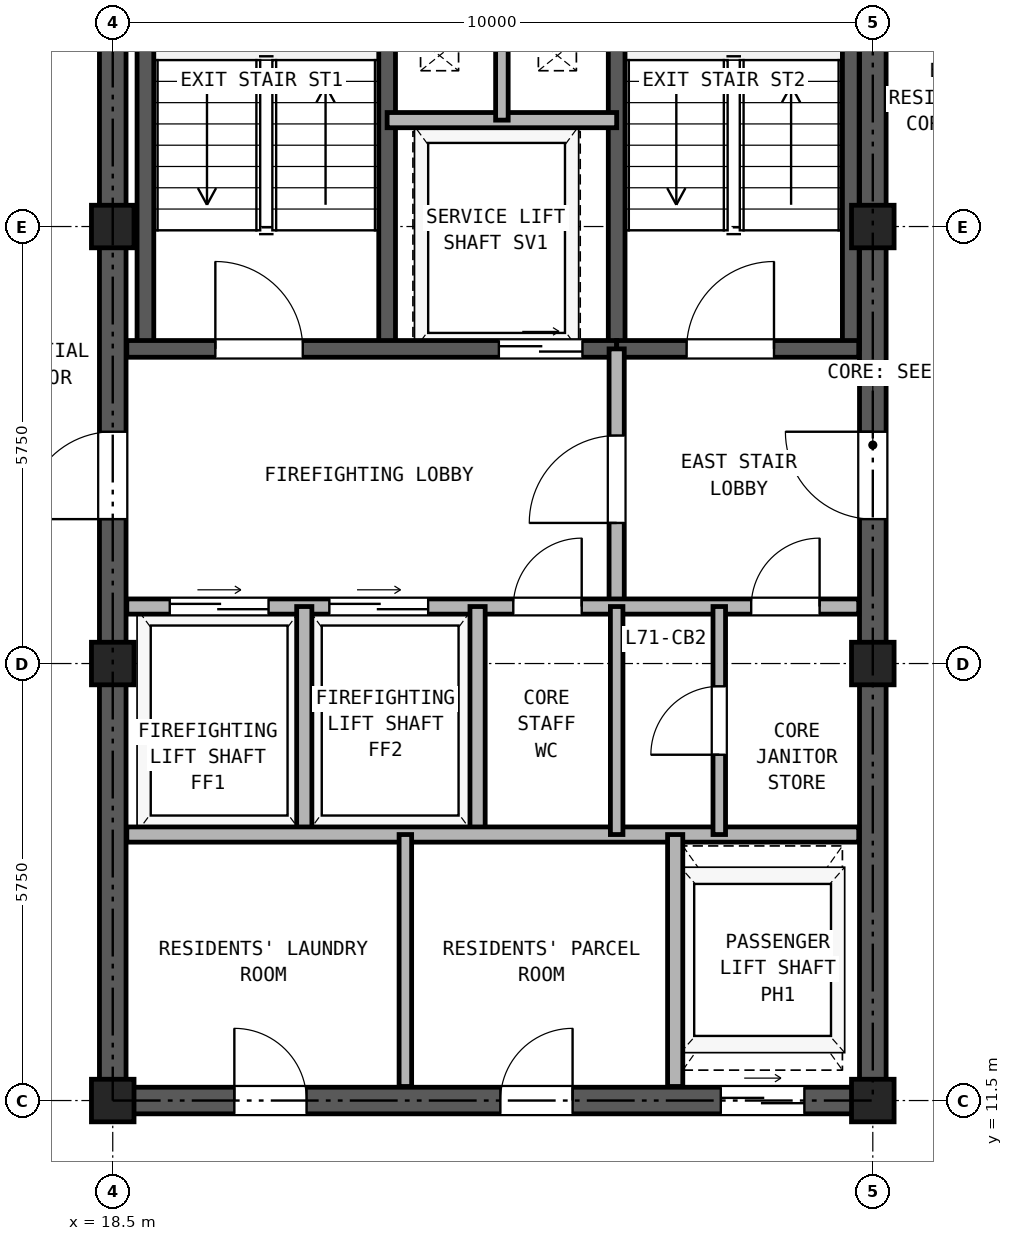
"""IFC4 building model, lengths in metres.
Left out: names, types, materials, properties, quantities, classifications, styles, units other than length and angle.
Written with IfcOpenShell. Run it as: python <this file> out.ifc"""

import sys

from ifc_helpers import new_model, si_unit, direction, frame, frame_2d, origin, origin_2d, place, context, subcontext, project, spatial, rectangle, hollow_rectangle, extrude, source, transform, mapped, element, fill, save


model = new_model("IFC4")
c1 = context("Model", 3, precision=1e-05, world=origin(), true_north=direction((0.0, 1.0)))
c2 = subcontext(c1, "Body", "Model", "MODEL_VIEW")
j1 = project(units=[si_unit("LENGTHUNIT", "METRE"), si_unit("PLANEANGLEUNIT", "RADIAN")], contexts=[c1])
p1 = place(None, origin())
s1 = spatial("IfcSite", under=j1, at=p1, CompositionType="ELEMENT")
p2 = place(p1, origin())
s2 = spatial("IfcBuilding", under=s1, at=p2, CompositionType="ELEMENT")
p3 = place(p2, frame((0.0, 0.0, 248.9)))
s3 = spatial("IfcBuildingStorey", under=s2, at=p3, CompositionType="ELEMENT", Elevation=248.9)
m1 = source(origin(), c2, "Body", "SweptSolid", [
    extrude(hollow_rectangle(XDim=0.56, YDim=0.56, WallThickness=0.03, at=origin_2d()), origin(), (0.0, 0.0, 1.0), 2.98),
])
for number, where, z_axis, x_axis in (
    (1, (18.5, 11.5, 0.0), (0.0, 0.0, 1.0), (1.0, 0.0, 0.0)),
    (2, (18.5, 17.25, 0.0), (0.0, 0.0, 1.0), (1.0, 0.0, 0.0)),
    (3, (18.5, 23.0, 0.0), (0.0, 0.0, 1.0), (1.0, 0.0, 0.0)),
    (4, (28.5, 11.5, 0.0), (0.0, 0.0, 1.0), (1.0, 0.0, 0.0)),
    (5, (28.5, 17.25, 0.0), (0.0, 0.0, 1.0), (1.0, 0.0, 0.0)),
    (6, (28.5, 23.0, 0.0), (0.0, 0.0, 1.0), (1.0, 0.0, 0.0)),
):
    element("IfcColumn", number, at=place(p3, frame(where, z_axis=z_axis, x_axis=x_axis)), inside=s3, PredefinedType="COLUMN", context=c2, shape_type="MappedRepresentation", body=[
        mapped(m1, transform((0.0, 0.0, 0.0), x_axis=(1.0, 0.0, 0.0), y_axis=(0.0, 1.0, 0.0), z_axis=(0.0, 0.0, 1.0), scale=1.0)),
    ])
p4 = place(p3, frame((18.325, 11.5, 0.0), z_axis=(0.0, 0.0, 1.0), x_axis=(1.0, 0.0, 0.0)))
e7 = element("IfcWall", 7, at=p4, inside=s3, PredefinedType="SHEAR", context=c2, shape_type="SweptSolid", body=[
    extrude(rectangle(XDim=10.35, YDim=0.35, at=frame_2d((5.175, 0.0))), origin(), (0.0, 0.0, 1.0), 2.98),
])
p5 = place(p4, frame((1.775, 0.0, 0.0)))
e8 = element("IfcOpeningElement", 8, at=p5, cuts=e7, PredefinedType="OPENING", context=c2, shape_type="SweptSolid", body=[
    extrude(rectangle(XDim=0.95, YDim=2.15, at=frame_2d((0.475, 1.075))), frame((0.0, 0.185, 0.0), z_axis=(0.0, -1.0, 0.0), x_axis=(1.0, 0.0, 0.0)), (0.0, 0.0, 1.0), 0.37),
])
p6 = place(p4, frame((5.275, 0.0, 0.0)))
e9 = element("IfcOpeningElement", 9, at=p6, cuts=e7, PredefinedType="OPENING", context=c2, shape_type="SweptSolid", body=[
    extrude(rectangle(XDim=0.95, YDim=2.15, at=frame_2d((0.475, 1.075))), frame((0.0, 0.185, 0.0), z_axis=(0.0, -1.0, 0.0), x_axis=(1.0, 0.0, 0.0)), (0.0, 0.0, 1.0), 0.37),
])
p7 = place(p4, frame((8.175, 0.0, 0.0)))
e10 = element("IfcOpeningElement", 10, at=p7, cuts=e7, PredefinedType="OPENING", context=c2, shape_type="SweptSolid", body=[
    extrude(rectangle(XDim=1.1, YDim=2.25, at=frame_2d((0.55, 1.125))), frame((0.0, 0.185, 0.0), z_axis=(0.0, -1.0, 0.0), x_axis=(1.0, 0.0, 0.0)), (0.0, 0.0, 1.0), 0.37),
])
p8 = place(p3, frame((18.5, 11.675, 0.0), z_axis=(0.0, 0.0, 1.0), x_axis=(0.0, 1.0, 0.0)))
e11 = element("IfcWall", 11, at=p8, inside=s3, PredefinedType="SHEAR", context=c2, shape_type="SweptSolid", body=[
    extrude(rectangle(XDim=16.9, YDim=0.35, at=frame_2d((8.45, 0.0))), origin(), (0.0, 0.0, 1.0), 2.98),
])
p9 = place(p8, frame((7.475, 0.0, 0.0)))
e12 = element("IfcOpeningElement", 12, at=p9, cuts=e11, PredefinedType="OPENING", context=c2, shape_type="SweptSolid", body=[
    extrude(rectangle(XDim=1.15, YDim=2.2, at=frame_2d((0.575, 1.1))), frame((0.0, 0.185, 0.0), z_axis=(0.0, -1.0, 0.0), x_axis=(1.0, 0.0, 0.0)), (0.0, 0.0, 1.0), 0.37),
])
p10 = place(p3, frame((28.5, 11.675, 0.0), z_axis=(0.0, 0.0, 1.0), x_axis=(0.0, 1.0, 0.0)))
e13 = element("IfcWall", 13, at=p10, inside=s3, PredefinedType="SHEAR", context=c2, shape_type="SweptSolid", body=[
    extrude(rectangle(XDim=16.9, YDim=0.35, at=frame_2d((8.45, 0.0))), origin(), (0.0, 0.0, 1.0), 2.98),
])
p11 = place(p10, frame((7.475, 0.0, 0.0)))
e14 = element("IfcOpeningElement", 14, at=p11, cuts=e13, PredefinedType="OPENING", context=c2, shape_type="SweptSolid", body=[
    extrude(rectangle(XDim=1.15, YDim=2.2, at=frame_2d((0.575, 1.1))), frame((0.0, 0.185, 0.0), z_axis=(0.0, -1.0, 0.0), x_axis=(1.0, 0.0, 0.0)), (0.0, 0.0, 1.0), 0.37),
])
for number, where, z_axis, x_axis in (
    (15, (18.93, 21.39, 0.0), (0.0, 0.0, 1.0), (0.0, 1.0, 0.0)),
    (16, (22.11, 21.39, 0.0), (0.0, 0.0, 1.0), (0.0, 1.0, 0.0)),
    (17, (25.13, 21.39, 0.0), (0.0, 0.0, 1.0), (0.0, 1.0, 0.0)),
):
    element("IfcWall", number, at=place(p3, frame(where, z_axis=z_axis, x_axis=x_axis)), inside=s3, PredefinedType="SOLIDWALL", context=c2, shape_type="SweptSolid", body=[
        extrude(rectangle(XDim=7.11, YDim=0.22, at=frame_2d((3.555, 0.0))), origin(), (0.0, 0.0, 1.0), 2.98),
    ])
p12 = place(p3, frame((28.21, 21.39, 0.0), z_axis=(0.0, 0.0, 1.0), x_axis=(0.0, 1.0, 0.0)))
e18 = element("IfcWall", 18, at=p12, inside=s3, PredefinedType="SOLIDWALL", context=c2, shape_type="SweptSolid", body=[
    extrude(rectangle(XDim=6.945, YDim=0.22, at=frame_2d((3.473, 0.0))), origin(), (0.0, 0.0, 1.0), 2.98),
])
p13 = place(p3, frame((18.685, 21.39, 0.0), z_axis=(0.0, 0.0, 1.0), x_axis=(1.0, 0.0, 0.0)))
e19 = element("IfcWall", 19, at=p13, inside=s3, PredefinedType="SOLIDWALL", context=c2, shape_type="SweptSolid", body=[
    extrude(rectangle(XDim=6.445, YDim=0.22, at=frame_2d((3.222, 0.0))), origin(), (0.0, 0.0, 1.0), 2.98),
])
p14 = place(p13, frame((1.165, 0.0, 0.0)))
e20 = element("IfcOpeningElement", 20, at=p14, cuts=e19, PredefinedType="OPENING", context=c2, shape_type="SweptSolid", body=[
    extrude(rectangle(XDim=1.15, YDim=2.2, at=frame_2d((0.575, 1.1))), frame((0.0, 0.12, 0.0), z_axis=(0.0, -1.0, 0.0), x_axis=(1.0, 0.0, 0.0)), (0.0, 0.0, 1.0), 0.24),
])
p15 = place(p13, frame((4.895, 0.0, 0.0)))
e21 = element("IfcOpeningElement", 21, at=p15, cuts=e19, PredefinedType="OPENING", context=c2, shape_type="SweptSolid", body=[
    extrude(rectangle(XDim=1.1, YDim=2.25, at=frame_2d((0.55, 1.125))), frame((0.0, 0.12, 0.0), z_axis=(0.0, -1.0, 0.0), x_axis=(1.0, 0.0, 0.0)), (0.0, 0.0, 1.0), 0.24),
])
p16 = place(p3, frame((25.13, 21.39, 0.0), z_axis=(0.0, 0.0, 1.0), x_axis=(1.0, 0.0, 0.0)))
e22 = element("IfcWall", 22, at=p16, inside=s3, PredefinedType="SOLIDWALL", context=c2, shape_type="SweptSolid", body=[
    extrude(rectangle(XDim=3.185, YDim=0.22, at=frame_2d((1.593, 0.0))), origin(), (0.0, 0.0, 1.0), 2.98),
])
p17 = place(p16, frame((0.92, 0.0, 0.0)))
e23 = element("IfcOpeningElement", 23, at=p17, cuts=e22, PredefinedType="OPENING", context=c2, shape_type="SweptSolid", body=[
    extrude(rectangle(XDim=1.15, YDim=2.2, at=frame_2d((0.575, 1.1))), frame((0.0, 0.12, 0.0), z_axis=(0.0, -1.0, 0.0), x_axis=(1.0, 0.0, 0.0)), (0.0, 0.0, 1.0), 0.24),
])
p18 = place(p3, frame((22.11, 24.4, 0.0), z_axis=(0.0, 0.0, 1.0), x_axis=(1.0, 0.0, 0.0)))
e24 = element("IfcWall", 24, at=p18, inside=s3, PredefinedType="PARTITIONING", context=c2, shape_type="SweptSolid", body=[
    extrude(rectangle(XDim=3.02, YDim=0.2, at=frame_2d((1.51, 0.0))), origin(), (0.0, 0.0, 1.0), 2.98),
])
p19 = place(p3, frame((23.62, 24.4, 0.0), z_axis=(0.0, 0.0, 1.0), x_axis=(0.0, 1.0, 0.0)))
e25 = element("IfcWall", 25, at=p19, inside=s3, PredefinedType="PARTITIONING", context=c2, shape_type="SweptSolid", body=[
    extrude(rectangle(XDim=4.165, YDim=0.165, at=frame_2d((2.083, 0.0))), origin(), (0.0, 0.0, 1.0), 2.98),
])
p20 = place(p3, frame((25.13, 18.0, 0.0), z_axis=(0.0, 0.0, 1.0), x_axis=(0.0, 1.0, 0.0)))
e26 = element("IfcWall", 26, at=p20, inside=s3, PredefinedType="PARTITIONING", context=c2, shape_type="SweptSolid", body=[
    extrude(rectangle(XDim=3.39, YDim=0.2, at=frame_2d((1.695, 0.0))), origin(), (0.0, 0.0, 1.0), 2.98),
])
p21 = place(p20, frame((1.1, 0.0, 0.0)))
e27 = element("IfcOpeningElement", 27, at=p21, cuts=e26, PredefinedType="OPENING", context=c2, shape_type="SweptSolid", body=[
    extrude(rectangle(XDim=1.15, YDim=2.2, at=frame_2d((0.575, 1.1))), frame((0.0, 0.11, 0.0), z_axis=(0.0, -1.0, 0.0), x_axis=(1.0, 0.0, 0.0)), (0.0, 0.0, 1.0), 0.22),
])
p22 = place(p3, frame((18.685, 18.0, 0.0), z_axis=(0.0, 0.0, 1.0), x_axis=(1.0, 0.0, 0.0)))
e28 = element("IfcWall", 28, at=p22, inside=s3, PredefinedType="PARTITIONING", context=c2, shape_type="SweptSolid", body=[
    extrude(rectangle(XDim=9.63, YDim=0.2, at=frame_2d((4.815, 0.0))), origin(), (0.0, 0.0, 1.0), 2.98),
])
p23 = place(p22, frame((0.565, 0.0, 0.0)))
e29 = element("IfcOpeningElement", 29, at=p23, cuts=e28, PredefinedType="OPENING", context=c2, shape_type="SweptSolid", body=[
    extrude(rectangle(XDim=1.3, YDim=2.3, at=frame_2d((0.65, 1.15))), frame((0.0, 0.11, 0.0), z_axis=(0.0, -1.0, 0.0), x_axis=(1.0, 0.0, 0.0)), (0.0, 0.0, 1.0), 0.22),
])
p24 = place(p22, frame((2.665, 0.0, 0.0)))
e30 = element("IfcOpeningElement", 30, at=p24, cuts=e28, PredefinedType="OPENING", context=c2, shape_type="SweptSolid", body=[
    extrude(rectangle(XDim=1.3, YDim=2.3, at=frame_2d((0.65, 1.15))), frame((0.0, 0.11, 0.0), z_axis=(0.0, -1.0, 0.0), x_axis=(1.0, 0.0, 0.0)), (0.0, 0.0, 1.0), 0.22),
])
p25 = place(p22, frame((5.085, 0.0, 0.0)))
e31 = element("IfcOpeningElement", 31, at=p25, cuts=e28, PredefinedType="OPENING", context=c2, shape_type="SweptSolid", body=[
    extrude(rectangle(XDim=0.9, YDim=2.05, at=frame_2d((0.45, 1.025))), frame((0.0, 0.11, 0.0), z_axis=(0.0, -1.0, 0.0), x_axis=(1.0, 0.0, 0.0)), (0.0, 0.0, 1.0), 0.22),
])
p26 = place(p22, frame((8.215, 0.0, 0.0)))
e32 = element("IfcOpeningElement", 32, at=p26, cuts=e28, PredefinedType="OPENING", context=c2, shape_type="SweptSolid", body=[
    extrude(rectangle(XDim=0.9, YDim=2.05, at=frame_2d((0.45, 1.025))), frame((0.0, 0.11, 0.0), z_axis=(0.0, -1.0, 0.0), x_axis=(1.0, 0.0, 0.0)), (0.0, 0.0, 1.0), 0.22),
])
for number, where, z_axis, x_axis in (
    (33, (21.02, 15.0, 0.0), (0.0, 0.0, 1.0), (0.0, 1.0, 0.0)),
    (34, (23.3, 15.0, 0.0), (0.0, 0.0, 1.0), (0.0, 1.0, 0.0)),
):
    element("IfcWall", number, at=place(p3, frame(where, z_axis=z_axis, x_axis=x_axis)), inside=s3, PredefinedType="PARTITIONING", context=c2, shape_type="SweptSolid", body=[
        extrude(rectangle(XDim=3.0, YDim=0.2, at=frame_2d((1.5, 0.0))), origin(), (0.0, 0.0, 1.0), 2.98),
    ])
p27 = place(p3, frame((18.685, 15.0, 0.0), z_axis=(0.0, 0.0, 1.0), x_axis=(1.0, 0.0, 0.0)))
e35 = element("IfcWall", 35, at=p27, inside=s3, PredefinedType="PARTITIONING", context=c2, shape_type="SweptSolid", body=[
    extrude(rectangle(XDim=9.63, YDim=0.2, at=frame_2d((4.815, 0.0))), origin(), (0.0, 0.0, 1.0), 2.98),
])
p28 = place(p3, frame((25.13, 15.0, 0.0), z_axis=(0.0, 0.0, 1.0), x_axis=(0.0, 1.0, 0.0)))
e36 = element("IfcWall", 36, at=p28, inside=s3, PredefinedType="PARTITIONING", context=c2, shape_type="SweptSolid", body=[
    extrude(rectangle(XDim=3.0, YDim=0.165, at=frame_2d((1.5, 0.0))), origin(), (0.0, 0.0, 1.0), 2.98),
])
p29 = place(p3, frame((26.48, 15.0, 0.0), z_axis=(0.0, 0.0, 1.0), x_axis=(0.0, 1.0, 0.0)))
e37 = element("IfcWall", 37, at=p29, inside=s3, PredefinedType="PARTITIONING", context=c2, shape_type="SweptSolid", body=[
    extrude(rectangle(XDim=3.0, YDim=0.165, at=frame_2d((1.5, 0.0))), origin(), (0.0, 0.0, 1.0), 2.98),
])
p30 = place(p29, frame((1.05, 0.0, 0.0)))
e38 = element("IfcOpeningElement", 38, at=p30, cuts=e37, PredefinedType="OPENING", context=c2, shape_type="SweptSolid", body=[
    extrude(rectangle(XDim=0.9, YDim=2.05, at=frame_2d((0.45, 1.025))), frame((0.0, 0.093, 0.0), z_axis=(0.0, -1.0, 0.0), x_axis=(1.0, 0.0, 0.0)), (0.0, 0.0, 1.0), 0.185),
])
p31 = place(p3, frame((22.35, 11.685, 0.0), z_axis=(0.0, 0.0, 1.0), x_axis=(0.0, 1.0, 0.0)))
e39 = element("IfcWall", 39, at=p31, inside=s3, PredefinedType="PARTITIONING", context=c2, shape_type="SweptSolid", body=[
    extrude(rectangle(XDim=3.315, YDim=0.165, at=frame_2d((1.657, 0.0))), origin(), (0.0, 0.0, 1.0), 2.98),
])
p32 = place(p3, frame((25.9, 11.685, 0.0), z_axis=(0.0, 0.0, 1.0), x_axis=(0.0, 1.0, 0.0)))
e40 = element("IfcWall", 40, at=p32, inside=s3, PredefinedType="PARTITIONING", context=c2, shape_type="SweptSolid", body=[
    extrude(rectangle(XDim=3.315, YDim=0.2, at=frame_2d((1.657, 0.0))), origin(), (0.0, 0.0, 1.0), 2.98),
])
p33 = place(p14, frame((1.15, 0.0, 0.0), z_axis=(0.0, 0.0, 1.0), x_axis=(-1.0, 0.0, 0.0)))
e41 = element("IfcDoor", 41, at=p33, inside=s3, OperationType="SINGLE_SWING_LEFT", PredefinedType="DOOR", context=c2, shape_type="SweptSolid", body=[
    extrude(rectangle(XDim=1.15, YDim=2.2, at=frame_2d((0.575, 1.1))), frame((0.0, 0.025, 0.0), z_axis=(0.0, -1.0, 0.0), x_axis=(1.0, 0.0, 0.0)), (0.0, 0.0, 1.0), 0.05),
])
fill(e20, e41)
p34 = place(p17, frame((1.15, 0.0, 0.0), z_axis=(0.0, 0.0, 1.0), x_axis=(-1.0, 0.0, 0.0)))
e42 = element("IfcDoor", 42, at=p34, inside=s3, OperationType="SINGLE_SWING_RIGHT", PredefinedType="DOOR", context=c2, shape_type="SweptSolid", body=[
    extrude(rectangle(XDim=1.15, YDim=2.2, at=frame_2d((0.575, 1.1))), frame((0.0, 0.025, 0.0), z_axis=(0.0, -1.0, 0.0), x_axis=(1.0, 0.0, 0.0)), (0.0, 0.0, 1.0), 0.05),
])
fill(e23, e42)
p35 = place(p15, frame((1.1, 0.0, 0.0), z_axis=(0.0, 0.0, 1.0), x_axis=(-1.0, 0.0, 0.0)))
e43 = element("IfcDoor", 43, at=p35, inside=s3, OperationType="DOUBLE_DOOR_SLIDING", PredefinedType="DOOR", context=c2, shape_type="SweptSolid", body=[
    extrude(rectangle(XDim=1.1, YDim=2.25, at=frame_2d((0.55, 1.125))), frame((0.0, 0.025, 0.0), z_axis=(0.0, -1.0, 0.0), x_axis=(1.0, 0.0, 0.0)), (0.0, 0.0, 1.0), 0.05),
])
fill(e21, e43)
p36 = place(p21, origin())
e44 = element("IfcDoor", 44, at=p36, inside=s3, OperationType="SINGLE_SWING_LEFT", PredefinedType="DOOR", context=c2, shape_type="SweptSolid", body=[
    extrude(rectangle(XDim=1.15, YDim=2.2, at=frame_2d((0.575, 1.1))), frame((0.0, 0.025, 0.0), z_axis=(0.0, -1.0, 0.0), x_axis=(1.0, 0.0, 0.0)), (0.0, 0.0, 1.0), 0.05),
])
fill(e27, e44)
p37 = place(p23, origin())
e45 = element("IfcDoor", 45, at=p37, inside=s3, OperationType="DOUBLE_DOOR_SLIDING", PredefinedType="DOOR", context=c2, shape_type="SweptSolid", body=[
    extrude(rectangle(XDim=1.3, YDim=2.3, at=frame_2d((0.65, 1.15))), frame((0.0, 0.025, 0.0), z_axis=(0.0, -1.0, 0.0), x_axis=(1.0, 0.0, 0.0)), (0.0, 0.0, 1.0), 0.05),
])
fill(e29, e45)
p38 = place(p24, origin())
e46 = element("IfcDoor", 46, at=p38, inside=s3, OperationType="DOUBLE_DOOR_SLIDING", PredefinedType="DOOR", context=c2, shape_type="SweptSolid", body=[
    extrude(rectangle(XDim=1.3, YDim=2.3, at=frame_2d((0.65, 1.15))), frame((0.0, 0.025, 0.0), z_axis=(0.0, -1.0, 0.0), x_axis=(1.0, 0.0, 0.0)), (0.0, 0.0, 1.0), 0.05),
])
fill(e30, e46)
p39 = place(p25, frame((0.9, 0.0, 0.0), z_axis=(0.0, 0.0, 1.0), x_axis=(-1.0, 0.0, 0.0)))
e47 = element("IfcDoor", 47, at=p39, inside=s3, OperationType="SINGLE_SWING_RIGHT", PredefinedType="DOOR", context=c2, shape_type="SweptSolid", body=[
    extrude(rectangle(XDim=0.9, YDim=2.05, at=frame_2d((0.45, 1.025))), frame((0.0, 0.025, 0.0), z_axis=(0.0, -1.0, 0.0), x_axis=(1.0, 0.0, 0.0)), (0.0, 0.0, 1.0), 0.05),
])
fill(e31, e47)
p40 = place(p30, origin())
e48 = element("IfcDoor", 48, at=p40, inside=s3, OperationType="SINGLE_SWING_LEFT", PredefinedType="DOOR", context=c2, shape_type="SweptSolid", body=[
    extrude(rectangle(XDim=0.9, YDim=2.05, at=frame_2d((0.45, 1.025))), frame((0.0, 0.025, 0.0), z_axis=(0.0, -1.0, 0.0), x_axis=(1.0, 0.0, 0.0)), (0.0, 0.0, 1.0), 0.05),
])
fill(e38, e48)
p41 = place(p26, frame((0.9, 0.0, 0.0), z_axis=(0.0, 0.0, 1.0), x_axis=(-1.0, 0.0, 0.0)))
e49 = element("IfcDoor", 49, at=p41, inside=s3, OperationType="SINGLE_SWING_RIGHT", PredefinedType="DOOR", context=c2, shape_type="SweptSolid", body=[
    extrude(rectangle(XDim=0.9, YDim=2.05, at=frame_2d((0.45, 1.025))), frame((0.0, 0.025, 0.0), z_axis=(0.0, -1.0, 0.0), x_axis=(1.0, 0.0, 0.0)), (0.0, 0.0, 1.0), 0.05),
])
fill(e32, e49)
p42 = place(p9, frame((1.15, 0.0, 0.0), z_axis=(0.0, 0.0, 1.0), x_axis=(-1.0, 0.0, 0.0)))
e50 = element("IfcDoor", 50, at=p42, inside=s3, OperationType="SINGLE_SWING_LEFT", PredefinedType="DOOR", context=c2, shape_type="SweptSolid", body=[
    extrude(rectangle(XDim=1.15, YDim=2.2, at=frame_2d((0.575, 1.1))), frame((0.0, 0.025, 0.0), z_axis=(0.0, -1.0, 0.0), x_axis=(1.0, 0.0, 0.0)), (0.0, 0.0, 1.0), 0.05),
])
fill(e12, e50)
p43 = place(p11, origin())
e51 = element("IfcDoor", 51, at=p43, inside=s3, OperationType="SINGLE_SWING_RIGHT", PredefinedType="DOOR", context=c2, shape_type="SweptSolid", body=[
    extrude(rectangle(XDim=1.15, YDim=2.2, at=frame_2d((0.575, 1.1))), frame((0.0, 0.025, 0.0), z_axis=(0.0, -1.0, 0.0), x_axis=(1.0, 0.0, 0.0)), (0.0, 0.0, 1.0), 0.05),
])
fill(e14, e51)
p44 = place(p5, frame((0.95, 0.0, 0.0), z_axis=(0.0, 0.0, 1.0), x_axis=(-1.0, 0.0, 0.0)))
e52 = element("IfcDoor", 52, at=p44, inside=s3, OperationType="SINGLE_SWING_LEFT", PredefinedType="DOOR", context=c2, shape_type="SweptSolid", body=[
    extrude(rectangle(XDim=0.95, YDim=2.15, at=frame_2d((0.475, 1.075))), frame((0.0, 0.025, 0.0), z_axis=(0.0, -1.0, 0.0), x_axis=(1.0, 0.0, 0.0)), (0.0, 0.0, 1.0), 0.05),
])
fill(e8, e52)
p45 = place(p6, frame((0.95, 0.0, 0.0), z_axis=(0.0, 0.0, 1.0), x_axis=(-1.0, 0.0, 0.0)))
e53 = element("IfcDoor", 53, at=p45, inside=s3, OperationType="SINGLE_SWING_RIGHT", PredefinedType="DOOR", context=c2, shape_type="SweptSolid", body=[
    extrude(rectangle(XDim=0.95, YDim=2.15, at=frame_2d((0.475, 1.075))), frame((0.0, 0.025, 0.0), z_axis=(0.0, -1.0, 0.0), x_axis=(1.0, 0.0, 0.0)), (0.0, 0.0, 1.0), 0.05),
])
fill(e9, e53)
p46 = place(p7, frame((1.1, 0.0, 0.0), z_axis=(0.0, 0.0, 1.0), x_axis=(-1.0, 0.0, 0.0)))
e54 = element("IfcDoor", 54, at=p46, inside=s3, OperationType="DOUBLE_DOOR_SLIDING", PredefinedType="DOOR", context=c2, shape_type="SweptSolid", body=[
    extrude(rectangle(XDim=1.1, YDim=2.25, at=frame_2d((0.55, 1.125))), frame((0.0, 0.025, 0.0), z_axis=(0.0, -1.0, 0.0), x_axis=(1.0, 0.0, 0.0)), (0.0, 0.0, 1.0), 0.05),
])
fill(e10, e54)
save(model, sys.argv[1])
